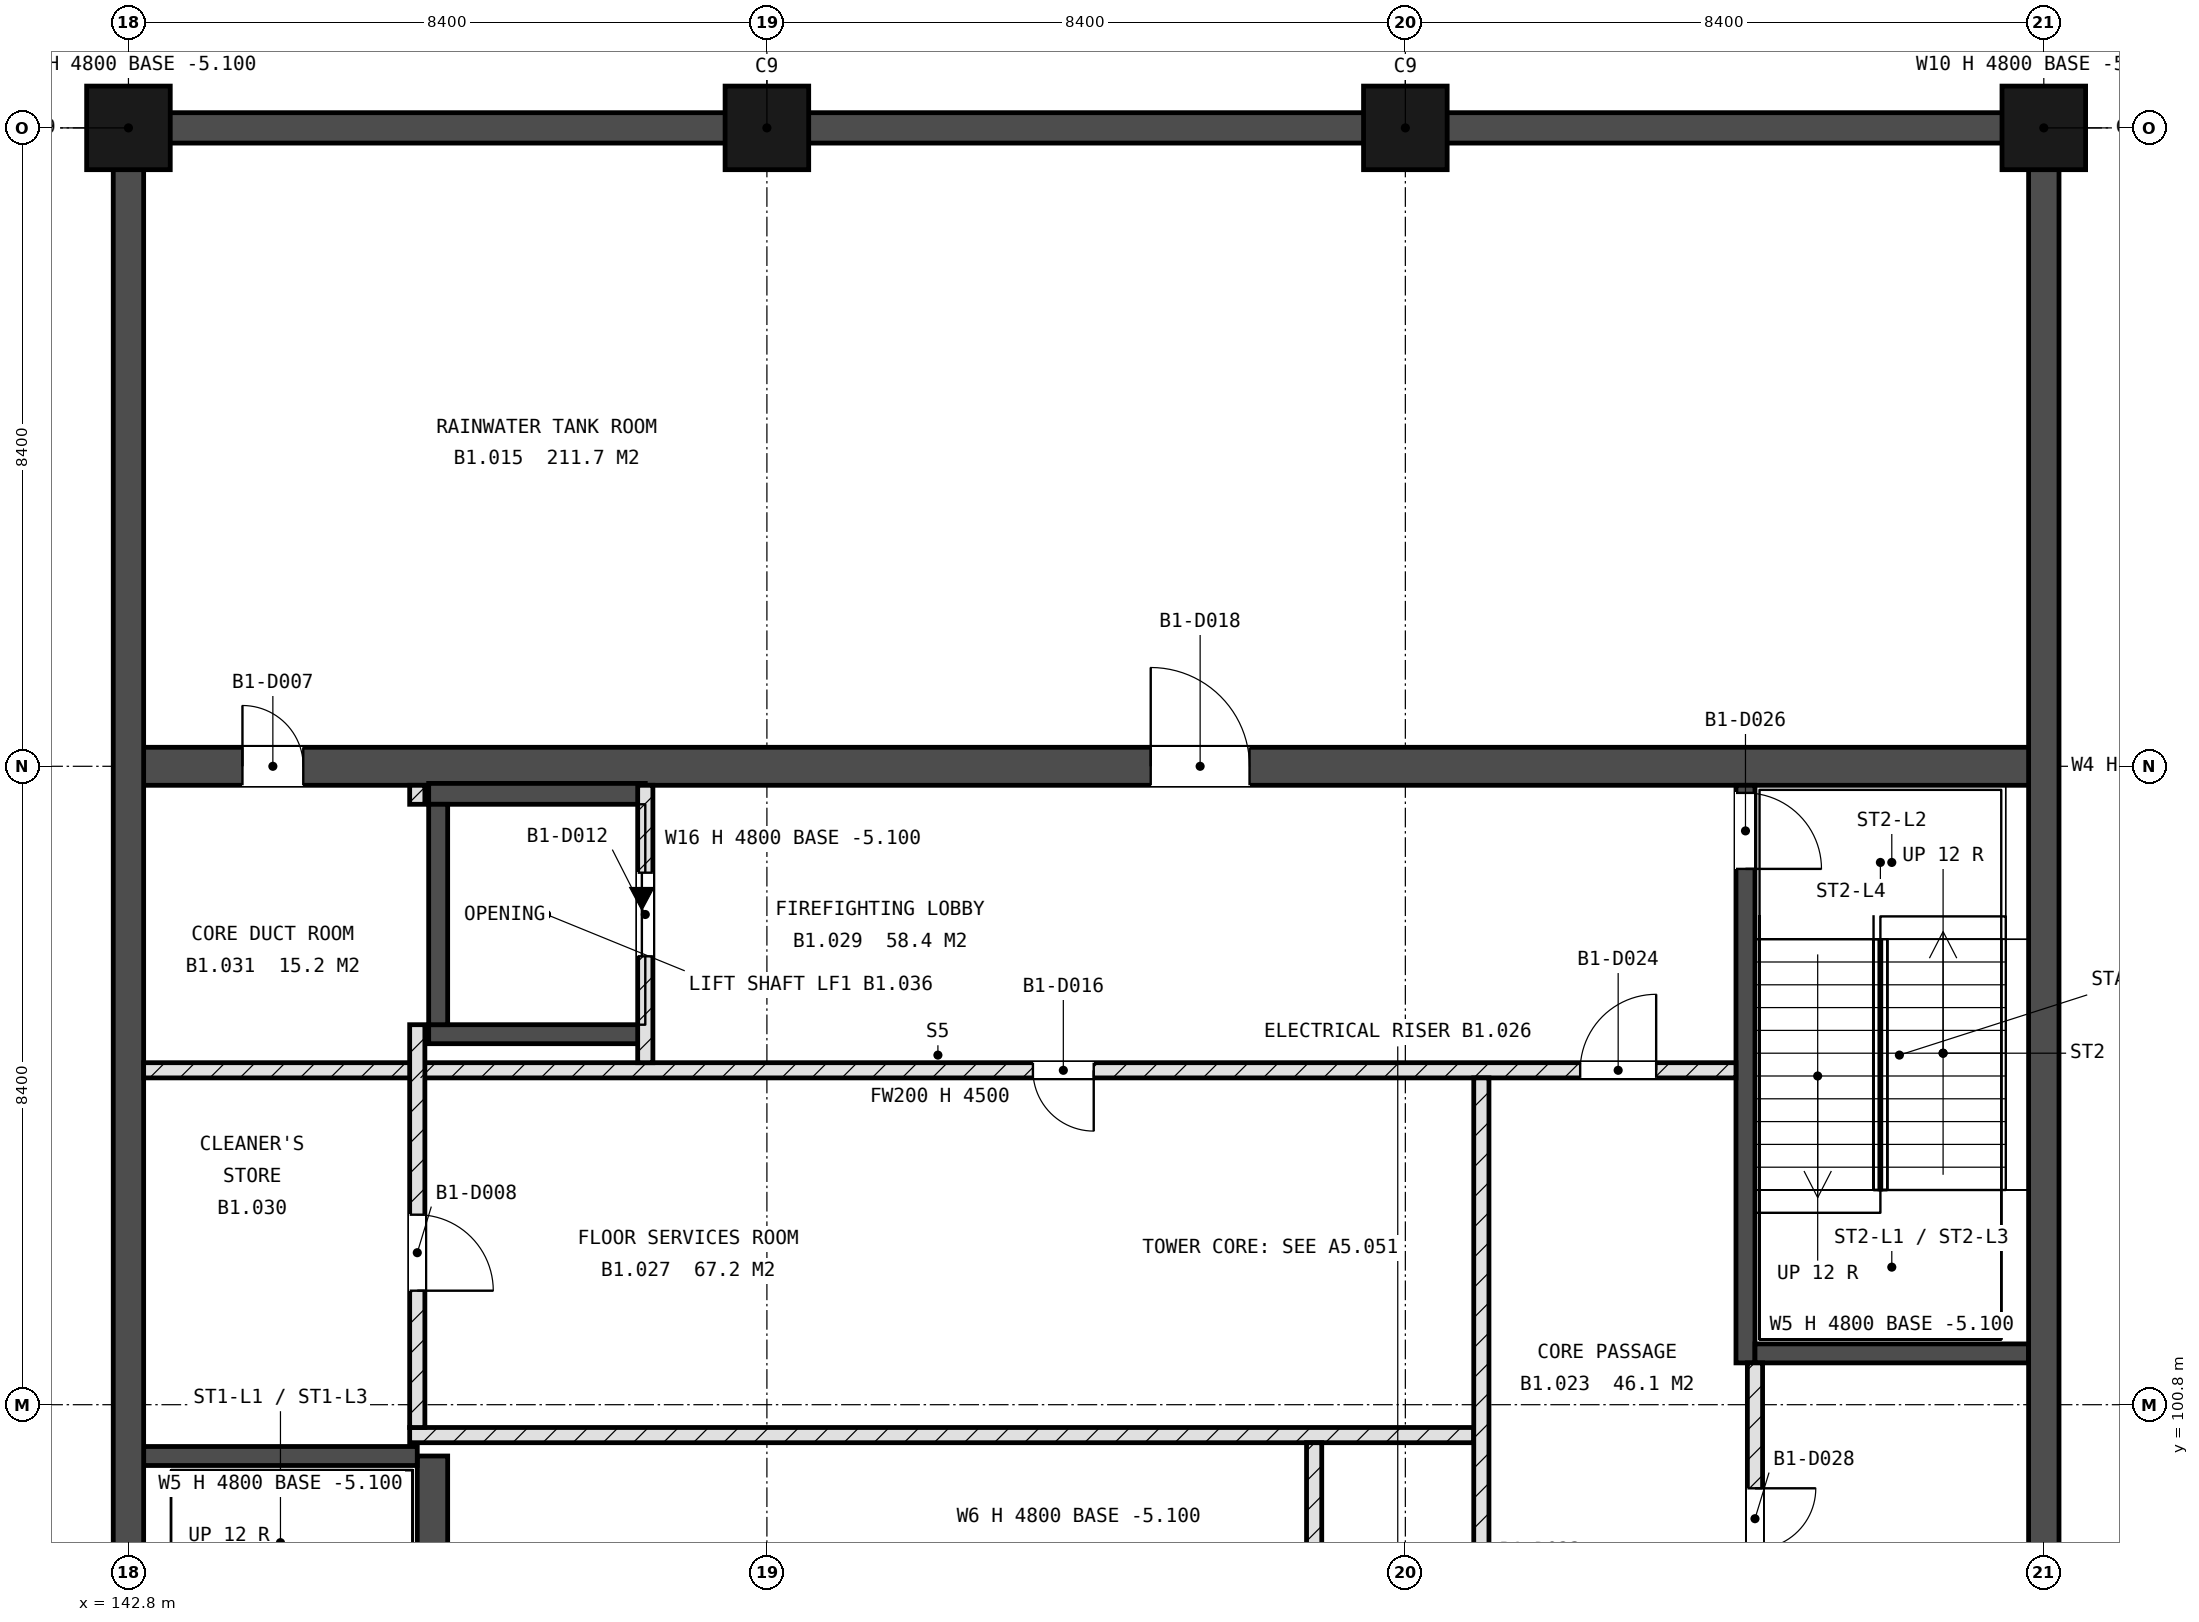
"""IFC4 building model, lengths in metres.
Left out: names, types, materials, properties, quantities, classifications, styles, units other than length and angle.
Written with IfcOpenShell. Run it as: python <this file> out.ifc"""

import sys

from ifc_helpers import new_model, si_unit, direction, frame, frame_2d, origin, origin_2d, place, context, subcontext, project, spatial, rectangle, extrude, element, fill, save


model = new_model("IFC4")
c1 = context("Model", 3, precision=1e-05, world=origin(), true_north=direction((0.0, 1.0)))
c2 = subcontext(c1, "Body", "Model", "MODEL_VIEW")
j1 = project(units=[si_unit("LENGTHUNIT", "METRE"), si_unit("PLANEANGLEUNIT", "RADIAN")], contexts=[c1])
p1 = place(None, origin())
s1 = spatial("IfcSite", under=j1, at=p1, CompositionType="ELEMENT")
p2 = place(p1, origin())
s2 = spatial("IfcBuilding", under=s1, at=p2, CompositionType="ELEMENT")
p3 = place(p2, frame((0.0, 0.0, -4.8)))
s3 = spatial("IfcBuildingStorey", under=s2, at=p3, CompositionType="ELEMENT", Elevation=-4.8)
for number, where, z_axis, x_axis in (
    (1, (142.8, 117.6, -0.3), (0.0, 0.0, 1.0), (1.0, 0.0, 0.0)),
    (2, (151.2, 117.6, -0.3), (0.0, 0.0, 1.0), (1.0, 0.0, 0.0)),
    (3, (159.6, 117.6, -0.3), (0.0, 0.0, 1.0), (1.0, 0.0, 0.0)),
    (4, (168.0, 117.6, -0.3), (0.0, 0.0, 1.0), (1.0, 0.0, 0.0)),
):
    element("IfcColumn", number, at=place(p3, frame(where, z_axis=z_axis, x_axis=x_axis)), inside=s3, PredefinedType="COLUMN", context=c2, shape_type="SweptSolid", body=[
        extrude(rectangle(XDim=1.1, YDim=1.1, at=origin_2d()), origin(), (0.0, 0.0, 1.0), 4.8),
    ])
p4 = place(p3, frame((142.8, 109.2, -0.3), z_axis=(0.0, 0.0, 1.0), x_axis=(1.0, 0.0, 0.0)))
e5 = element("IfcWall", 5, at=p4, inside=s3, PredefinedType="SHEAR", context=c2, shape_type="SweptSolid", body=[
    extrude(rectangle(XDim=25.2, YDim=0.5, at=frame_2d((12.6, 0.0))), origin(), (0.0, 0.0, 1.0), 4.8),
])
p5 = place(p4, frame((13.45, 0.0, 0.3)))
e6 = element("IfcOpeningElement", 6, at=p5, cuts=e5, PredefinedType="OPENING", context=c2, shape_type="SweptSolid", body=[
    extrude(rectangle(XDim=1.3, YDim=2.1, at=frame_2d((0.65, 1.05))), frame((0.0, 0.26, 0.0), z_axis=(0.0, -1.0, 0.0), x_axis=(1.0, 0.0, 0.0)), (0.0, 0.0, 1.0), 0.52),
])
p6 = place(p4, frame((1.5, 0.0, 0.3)))
e7 = element("IfcOpeningElement", 7, at=p6, cuts=e5, PredefinedType="OPENING", context=c2, shape_type="SweptSolid", body=[
    extrude(rectangle(XDim=0.8, YDim=2.1, at=frame_2d((0.4, 1.05))), frame((0.0, 0.26, 0.0), z_axis=(0.0, -1.0, 0.0), x_axis=(1.0, 0.0, 0.0)), (0.0, 0.0, 1.0), 0.52),
])
p7 = place(p3, frame((146.8, 92.65, -0.3), z_axis=(0.0, 0.0, 1.0), x_axis=(0.0, 1.0, 0.0)))
e8 = element("IfcWall", 8, at=p7, inside=s3, PredefinedType="SHEAR", context=c2, shape_type="SweptSolid", body=[
    extrude(rectangle(XDim=7.475, YDim=0.4, at=frame_2d((3.738, 0.0))), origin(), (0.0, 0.0, 1.0), 4.8),
])
p8 = place(p7, frame((0.1, 0.0, 0.3)))
e9 = element("IfcOpeningElement", 9, at=p8, cuts=e8, PredefinedType="OPENING", context=c2, shape_type="SweptSolid", body=[
    extrude(rectangle(XDim=1.0, YDim=2.1, at=frame_2d((0.5, 1.05))), frame((0.0, 0.21, 0.0), z_axis=(0.0, -1.0, 0.0), x_axis=(1.0, 0.0, 0.0)), (0.0, 0.0, 1.0), 0.42),
])
p9 = place(p3, frame((143.0, 100.125, -0.3), z_axis=(0.0, 0.0, 1.0), x_axis=(1.0, 0.0, 0.0)))
e10 = element("IfcWall", 10, at=p9, inside=s3, PredefinedType="SHEAR", context=c2, shape_type="SweptSolid", body=[
    extrude(rectangle(XDim=3.6, YDim=0.25, at=frame_2d((1.8, 0.0))), origin(), (0.0, 0.0, 1.0), 4.8),
])
p10 = place(p3, frame((164.075, 101.35, -0.3), z_axis=(0.0, 0.0, 1.0), x_axis=(0.0, 1.0, 0.0)))
e11 = element("IfcWall", 11, at=p10, inside=s3, PredefinedType="SHEAR", context=c2, shape_type="SweptSolid", body=[
    extrude(rectangle(XDim=7.6, YDim=0.25, at=frame_2d((3.8, 0.0))), origin(), (0.0, 0.0, 1.0), 4.8),
])
p11 = place(p10, frame((6.5, 0.0, 0.3)))
e12 = element("IfcOpeningElement", 12, at=p11, cuts=e11, PredefinedType="OPENING", context=c2, shape_type="SweptSolid", body=[
    extrude(rectangle(XDim=1.0, YDim=2.1, at=frame_2d((0.5, 1.05))), frame((0.0, 0.135, 0.0), z_axis=(0.0, -1.0, 0.0), x_axis=(1.0, 0.0, 0.0)), (0.0, 0.0, 1.0), 0.27),
])
p12 = place(p3, frame((164.2, 101.475, -0.3), z_axis=(0.0, 0.0, 1.0), x_axis=(1.0, 0.0, 0.0)))
e13 = element("IfcWall", 13, at=p12, inside=s3, PredefinedType="SHEAR", context=c2, shape_type="SweptSolid", body=[
    extrude(rectangle(XDim=3.6, YDim=0.25, at=frame_2d((1.8, 0.0))), origin(), (0.0, 0.0, 1.0), 4.8),
])
p13 = place(p3, frame((146.75, 105.675, -0.3), z_axis=(0.0, 0.0, 1.0), x_axis=(1.0, 0.0, 0.0)))
e14 = element("IfcWall", 14, at=p13, inside=s3, PredefinedType="SHEAR", context=c2, shape_type="SweptSolid", body=[
    extrude(rectangle(XDim=2.85, YDim=0.25, at=frame_2d((1.425, 0.0))), origin(), (0.0, 0.0, 1.0), 4.8),
])
p14 = place(p3, frame((146.75, 108.837, -0.3), z_axis=(0.0, 0.0, 1.0), x_axis=(1.0, 0.0, 0.0)))
e15 = element("IfcWall", 15, at=p14, inside=s3, PredefinedType="SHEAR", context=c2, shape_type="SweptSolid", body=[
    extrude(rectangle(XDim=2.85, YDim=0.275, at=frame_2d((1.425, 0.0))), origin(), (0.0, 0.0, 1.0), 4.8),
])
p15 = place(p3, frame((146.875, 105.8, -0.3), z_axis=(0.0, 0.0, 1.0), x_axis=(0.0, 1.0, 0.0)))
e16 = element("IfcWall", 16, at=p15, inside=s3, PredefinedType="SHEAR", context=c2, shape_type="SweptSolid", body=[
    extrude(rectangle(XDim=2.9, YDim=0.25, at=frame_2d((1.45, 0.0))), origin(), (0.0, 0.0, 1.0), 4.8),
])
p16 = place(p3, frame((168.0, -0.2, -0.3), z_axis=(0.0, 0.0, 1.0), x_axis=(0.0, 1.0, 0.0)))
e17 = element("IfcWall", 17, at=p16, inside=s3, PredefinedType="SOLIDWALL", context=c2, shape_type="SweptSolid", body=[
    extrude(rectangle(XDim=118.0, YDim=0.4, at=frame_2d((59.0, 0.0))), origin(), (0.0, 0.0, 1.0), 4.8),
])
p17 = place(p3, frame((168.2, 117.6, -0.3), z_axis=(0.0, 0.0, 1.0), x_axis=(-1.0, 0.0, 0.0)))
e18 = element("IfcWall", 18, at=p17, inside=s3, PredefinedType="SOLIDWALL", context=c2, shape_type="SweptSolid", body=[
    extrude(rectangle(XDim=25.6, YDim=0.4, at=frame_2d((12.8, 0.0))), origin(), (0.0, 0.0, 1.0), 4.8),
])
p18 = place(p3, frame((142.8, 117.8, -0.3), z_axis=(0.0, 0.0, 1.0), x_axis=(0.0, -1.0, 0.0)))
e19 = element("IfcWall", 19, at=p18, inside=s3, PredefinedType="SOLIDWALL", context=c2, shape_type="SweptSolid", body=[
    extrude(rectangle(XDim=34.0, YDim=0.4, at=frame_2d((17.0, 0.0))), origin(), (0.0, 0.0, 1.0), 4.8),
])
p19 = place(p3, frame((146.5, 100.4, 0.0), z_axis=(0.0, 0.0, 1.0), x_axis=(1.0, 0.0, 0.0)))
e20 = element("IfcWall", 20, at=p19, inside=s3, PredefinedType="SOLIDWALL", context=c2, shape_type="SweptSolid", body=[
    extrude(rectangle(XDim=14.0, YDim=0.2, at=frame_2d((7.0, 0.0))), origin(), (0.0, 0.0, 1.0), 4.5),
])
p20 = place(p3, frame((143.0, 105.2, 0.0), z_axis=(0.0, 0.0, 1.0), x_axis=(1.0, 0.0, 0.0)))
e21 = element("IfcWall", 21, at=p20, inside=s3, PredefinedType="SOLIDWALL", context=c2, shape_type="SweptSolid", body=[
    extrude(rectangle(XDim=20.95, YDim=0.2, at=frame_2d((10.475, 0.0))), origin(), (0.0, 0.0, 1.0), 4.5),
])
p21 = place(p20, frame((11.7, 0.0, 0.0)))
e22 = element("IfcOpeningElement", 22, at=p21, cuts=e21, PredefinedType="OPENING", context=c2, shape_type="SweptSolid", body=[
    extrude(rectangle(XDim=0.8, YDim=2.1, at=frame_2d((0.4, 1.05))), frame((0.0, 0.11, 0.0), z_axis=(0.0, -1.0, 0.0), x_axis=(1.0, 0.0, 0.0)), (0.0, 0.0, 1.0), 0.22),
])
p22 = place(p20, frame((18.9, 0.0, 0.0)))
e23 = element("IfcOpeningElement", 23, at=p22, cuts=e21, PredefinedType="OPENING", context=c2, shape_type="SweptSolid", body=[
    extrude(rectangle(XDim=1.0, YDim=2.1, at=frame_2d((0.5, 1.05))), frame((0.0, 0.11, 0.0), z_axis=(0.0, -1.0, 0.0), x_axis=(1.0, 0.0, 0.0)), (0.0, 0.0, 1.0), 0.22),
])
p23 = place(p3, frame((146.6, 100.5, 0.0), z_axis=(0.0, 0.0, 1.0), x_axis=(0.0, 1.0, 0.0)))
e24 = element("IfcWall", 24, at=p23, inside=s3, PredefinedType="SOLIDWALL", context=c2, shape_type="SweptSolid", body=[
    extrude(rectangle(XDim=5.3, YDim=0.2, at=frame_2d((2.65, 0.0))), origin(), (0.0, 0.0, 1.0), 4.5),
])
p24 = place(p23, frame((1.8, 0.0, 0.0)))
e25 = element("IfcOpeningElement", 25, at=p24, cuts=e24, PredefinedType="OPENING", context=c2, shape_type="SweptSolid", body=[
    extrude(rectangle(XDim=1.0, YDim=2.1, at=frame_2d((0.5, 1.05))), frame((0.0, 0.11, 0.0), z_axis=(0.0, -1.0, 0.0), x_axis=(1.0, 0.0, 0.0)), (0.0, 0.0, 1.0), 0.22),
])
p25 = place(p3, frame((146.6, 108.7, 0.0), z_axis=(0.0, 0.0, 1.0), x_axis=(0.0, 1.0, 0.0)))
e26 = element("IfcWall", 26, at=p25, inside=s3, PredefinedType="SOLIDWALL", context=c2, shape_type="SweptSolid", body=[
    extrude(rectangle(XDim=0.25, YDim=0.2, at=frame_2d((0.125, 0.0))), origin(), (0.0, 0.0, 1.0), 4.5),
])
p26 = place(p3, frame((149.6, 105.3, 0.0), z_axis=(0.0, 0.0, 1.0), x_axis=(0.0, 1.0, 0.0)))
e27 = element("IfcWall", 27, at=p26, inside=s3, PredefinedType="SOLIDWALL", context=c2, shape_type="SweptSolid", body=[
    extrude(rectangle(XDim=3.65, YDim=0.2, at=frame_2d((1.825, 0.0))), origin(), (0.0, 0.0, 1.0), 4.5),
])
p27 = place(p26, frame((1.4, 0.0, 0.0)))
e28 = element("IfcOpeningElement", 28, at=p27, cuts=e27, PredefinedType="OPENING", context=c2, shape_type="SweptSolid", body=[
    extrude(rectangle(XDim=1.1, YDim=2.1, at=frame_2d((0.55, 1.05))), frame((0.0, 0.11, 0.0), z_axis=(0.0, -1.0, 0.0), x_axis=(1.0, 0.0, 0.0)), (0.0, 0.0, 1.0), 0.22),
])
p28 = place(p3, frame((158.4, 98.7, 0.0), z_axis=(0.0, 0.0, 1.0), x_axis=(0.0, 1.0, 0.0)))
e29 = element("IfcWall", 29, at=p28, inside=s3, PredefinedType="SOLIDWALL", context=c2, shape_type="SweptSolid", body=[
    extrude(rectangle(XDim=1.6, YDim=0.2, at=frame_2d((0.8, 0.0))), origin(), (0.0, 0.0, 1.0), 4.5),
])
p29 = place(p3, frame((160.6, 92.65, 0.0), z_axis=(0.0, 0.0, 1.0), x_axis=(0.0, 1.0, 0.0)))
e30 = element("IfcWall", 30, at=p29, inside=s3, PredefinedType="SOLIDWALL", context=c2, shape_type="SweptSolid", body=[
    extrude(rectangle(XDim=12.45, YDim=0.2, at=frame_2d((6.225, 0.0))), origin(), (0.0, 0.0, 1.0), 4.5),
])
p30 = place(p29, frame((5.05, 0.0, 0.0)))
e31 = element("IfcOpeningElement", 31, at=p30, cuts=e30, PredefinedType="OPENING", context=c2, shape_type="SweptSolid", body=[
    extrude(rectangle(XDim=0.8, YDim=2.1, at=frame_2d((0.4, 1.05))), frame((0.0, 0.11, 0.0), z_axis=(0.0, -1.0, 0.0), x_axis=(1.0, 0.0, 0.0)), (0.0, 0.0, 1.0), 0.22),
])
p31 = place(p29, frame((0.75, 0.0, 0.0)))
e32 = element("IfcOpeningElement", 32, at=p31, cuts=e30, PredefinedType="OPENING", context=c2, shape_type="SweptSolid", body=[
    extrude(rectangle(XDim=1.0, YDim=2.1, at=frame_2d((0.5, 1.05))), frame((0.0, 0.11, 0.0), z_axis=(0.0, -1.0, 0.0), x_axis=(1.0, 0.0, 0.0)), (0.0, 0.0, 1.0), 0.22),
])
p32 = place(p3, frame((164.2, 92.65, 0.0), z_axis=(0.0, 0.0, 1.0), x_axis=(0.0, 1.0, 0.0)))
e33 = element("IfcWall", 33, at=p32, inside=s3, PredefinedType="SOLIDWALL", context=c2, shape_type="SweptSolid", body=[
    extrude(rectangle(XDim=8.7, YDim=0.2, at=frame_2d((4.35, 0.0))), origin(), (0.0, 0.0, 1.0), 4.5),
])
p33 = place(p32, frame((1.65, 0.0, 0.0)))
e34 = element("IfcOpeningElement", 34, at=p33, cuts=e33, PredefinedType="OPENING", context=c2, shape_type="SweptSolid", body=[
    extrude(rectangle(XDim=0.8, YDim=2.1, at=frame_2d((0.4, 1.05))), frame((0.0, 0.11, 0.0), z_axis=(0.0, -1.0, 0.0), x_axis=(1.0, 0.0, 0.0)), (0.0, 0.0, 1.0), 0.22),
])
p34 = place(p32, frame((6.25, 0.0, 0.0)))
e35 = element("IfcOpeningElement", 35, at=p34, cuts=e33, PredefinedType="OPENING", context=c2, shape_type="SweptSolid", body=[
    extrude(rectangle(XDim=0.8, YDim=2.1, at=frame_2d((0.4, 1.05))), frame((0.0, 0.11, 0.0), z_axis=(0.0, -1.0, 0.0), x_axis=(1.0, 0.0, 0.0)), (0.0, 0.0, 1.0), 0.22),
])
p35 = place(p27, origin())
e36 = element("IfcDoor", 36, at=p35, inside=s3, OperationType="SLIDING_TO_LEFT", PredefinedType="DOOR", context=c2, shape_type="SweptSolid", body=[
    extrude(rectangle(XDim=1.1, YDim=2.1, at=frame_2d((0.55, 1.05))), frame((0.0, 0.025, 0.0), z_axis=(0.0, -1.0, 0.0), x_axis=(1.0, 0.0, 0.0)), (0.0, 0.0, 1.0), 0.05),
])
fill(e28, e36)
p36 = place(p11, origin())
e37 = element("IfcDoor", 37, at=p36, inside=s3, OperationType="SINGLE_SWING_LEFT", PredefinedType="DOOR", context=c2, shape_type="SweptSolid", body=[
    extrude(rectangle(XDim=1.0, YDim=2.1, at=frame_2d((0.5, 1.05))), frame((0.0, 0.025, 0.0), z_axis=(0.0, -1.0, 0.0), x_axis=(1.0, 0.0, 0.0)), (0.0, 0.0, 1.0), 0.05),
])
fill(e12, e37)
p37 = place(p5, origin())
e38 = element("IfcDoor", 38, at=p37, inside=s3, OperationType="SINGLE_SWING_RIGHT", PredefinedType="DOOR", context=c2, shape_type="SweptSolid", body=[
    extrude(rectangle(XDim=1.3, YDim=2.1, at=frame_2d((0.65, 1.05))), frame((0.0, 0.025, 0.0), z_axis=(0.0, -1.0, 0.0), x_axis=(1.0, 0.0, 0.0)), (0.0, 0.0, 1.0), 0.05),
])
fill(e6, e38)
p38 = place(p34, origin())
e39 = element("IfcDoor", 39, at=p38, inside=s3, OperationType="SINGLE_SWING_RIGHT", PredefinedType="DOOR", context=c2, shape_type="SweptSolid", body=[
    extrude(rectangle(XDim=0.8, YDim=2.1, at=frame_2d((0.4, 1.05))), frame((0.0, 0.025, 0.0), z_axis=(0.0, -1.0, 0.0), x_axis=(1.0, 0.0, 0.0)), (0.0, 0.0, 1.0), 0.05),
])
fill(e35, e39)
p39 = place(p21, origin())
e40 = element("IfcDoor", 40, at=p39, inside=s3, OperationType="SINGLE_SWING_RIGHT", PredefinedType="DOOR", context=c2, shape_type="SweptSolid", body=[
    extrude(rectangle(XDim=0.8, YDim=2.1, at=frame_2d((0.4, 1.05))), frame((0.0, 0.025, 0.0), z_axis=(0.0, -1.0, 0.0), x_axis=(1.0, 0.0, 0.0)), (0.0, 0.0, 1.0), 0.05),
])
fill(e22, e40)
p40 = place(p24, origin())
e41 = element("IfcDoor", 41, at=p40, inside=s3, OperationType="SINGLE_SWING_LEFT", PredefinedType="DOOR", context=c2, shape_type="SweptSolid", body=[
    extrude(rectangle(XDim=1.0, YDim=2.1, at=frame_2d((0.5, 1.05))), frame((0.0, 0.025, 0.0), z_axis=(0.0, -1.0, 0.0), x_axis=(1.0, 0.0, 0.0)), (0.0, 0.0, 1.0), 0.05),
])
fill(e25, e41)
p41 = place(p6, origin())
e42 = element("IfcDoor", 42, at=p41, inside=s3, OperationType="SINGLE_SWING_RIGHT", PredefinedType="DOOR", context=c2, shape_type="SweptSolid", body=[
    extrude(rectangle(XDim=0.8, YDim=2.1, at=frame_2d((0.4, 1.05))), frame((0.0, 0.025, 0.0), z_axis=(0.0, -1.0, 0.0), x_axis=(1.0, 0.0, 0.0)), (0.0, 0.0, 1.0), 0.05),
])
fill(e7, e42)
p42 = place(p22, origin())
e43 = element("IfcDoor", 43, at=p42, inside=s3, OperationType="SINGLE_SWING_LEFT", PredefinedType="DOOR", context=c2, shape_type="SweptSolid", body=[
    extrude(rectangle(XDim=1.0, YDim=2.1, at=frame_2d((0.5, 1.05))), frame((0.0, 0.025, 0.0), z_axis=(0.0, -1.0, 0.0), x_axis=(1.0, 0.0, 0.0)), (0.0, 0.0, 1.0), 0.05),
])
fill(e23, e43)
save(model, sys.argv[1])
